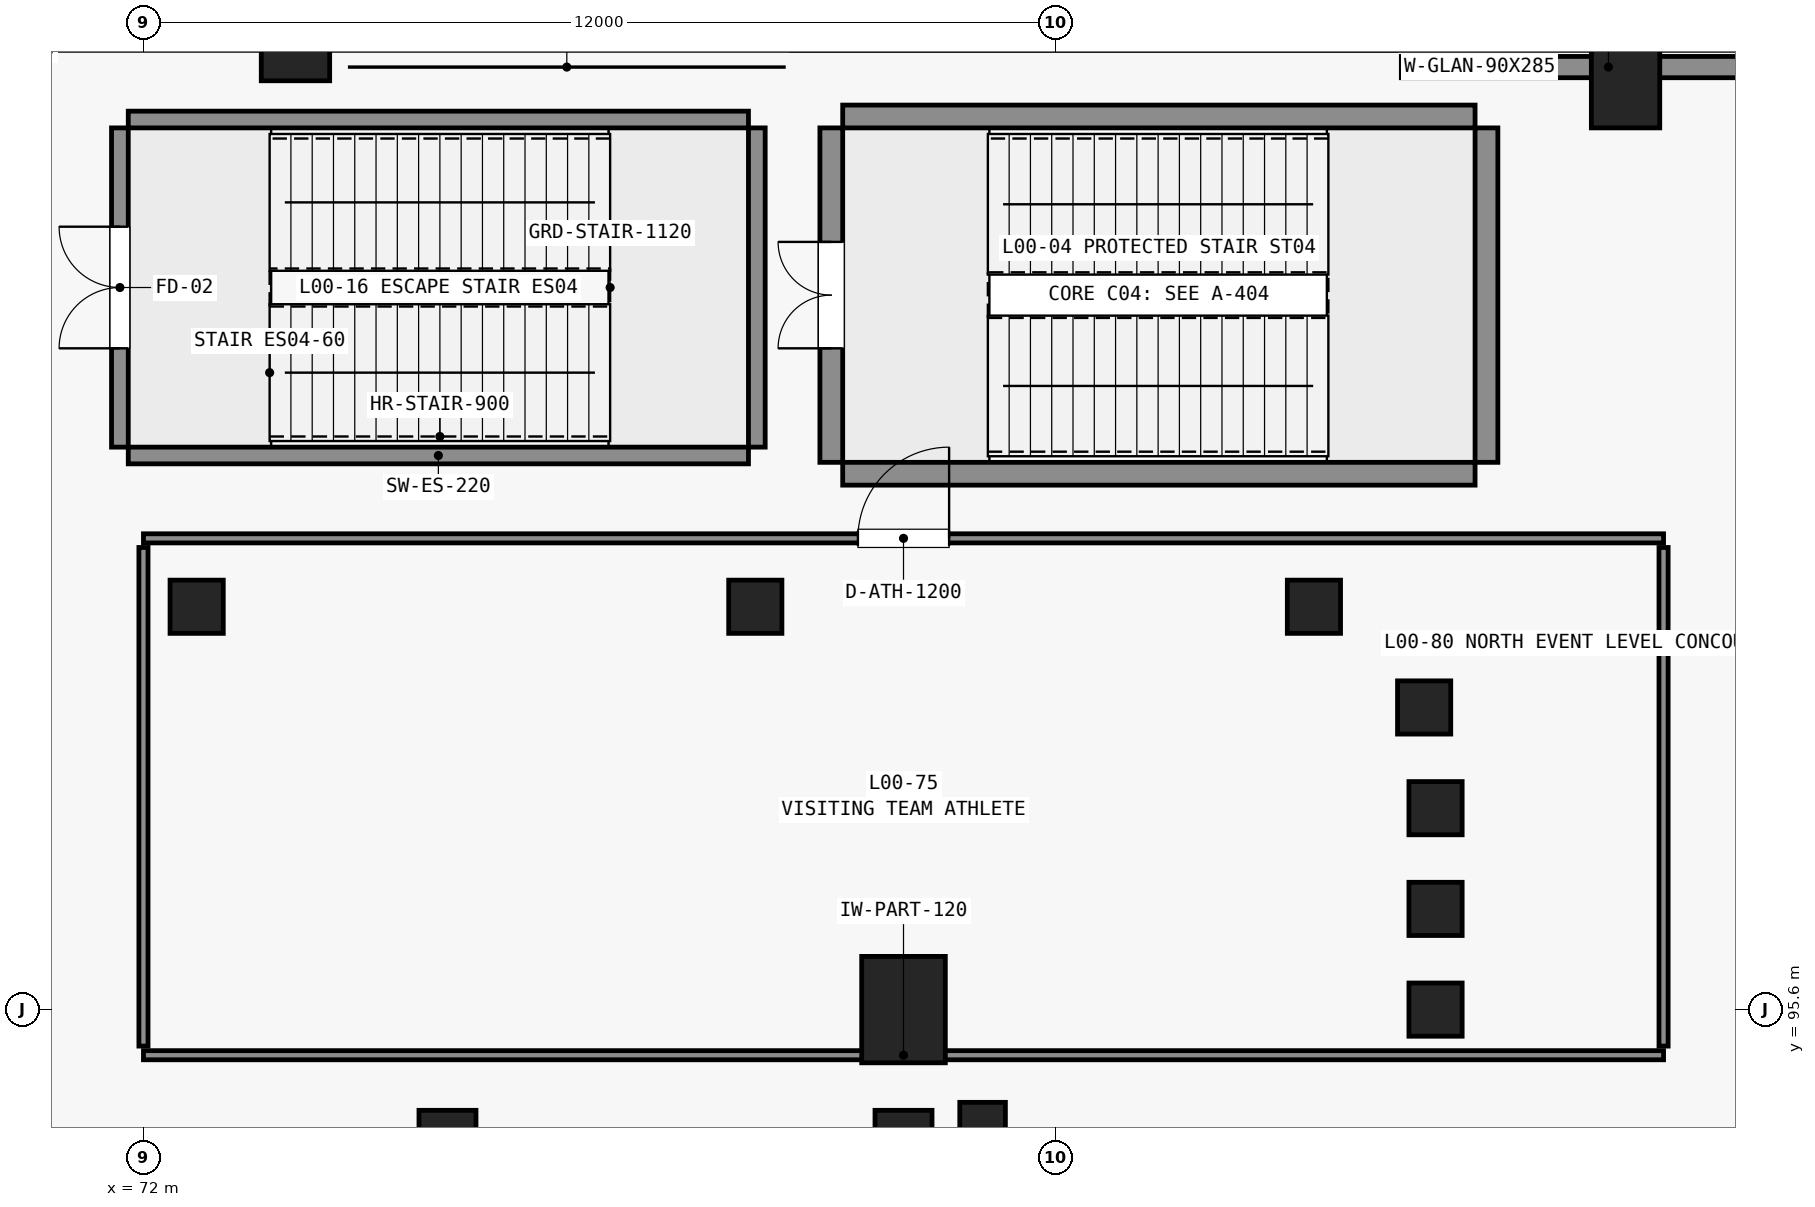
"""IFC4 building model, lengths in metres.
Left out: names, types, materials, properties, quantities, classifications, styles, units other than length and angle.
Written with IfcOpenShell. Run it as: python <this file> out.ifc"""

import sys

from ifc_helpers import new_model, si_unit, direction, frame, frame_2d, origin, origin_2d, place, context, subcontext, project, spatial, rectangle, extrude, element, fill, save


model = new_model("IFC4")
c1 = context("Model", 3, precision=1e-05, world=origin(), true_north=direction((0.0, 1.0)))
c2 = subcontext(c1, "Body", "Model", "MODEL_VIEW")
j1 = project(units=[si_unit("LENGTHUNIT", "METRE"), si_unit("PLANEANGLEUNIT", "RADIAN")], contexts=[c1])
p1 = place(None, origin())
s1 = spatial("IfcSite", under=j1, at=p1, CompositionType="ELEMENT")
p2 = place(p1, origin())
s2 = spatial("IfcBuilding", under=s1, at=p2, CompositionType="ELEMENT")
p3 = place(p2, origin())
s3 = spatial("IfcBuildingStorey", under=s2, at=p3, CompositionType="ELEMENT", Elevation=0.0)
p4 = place(p3, frame((82.0, 95.6, 0.0), z_axis=(0.0, 0.0, 1.0), x_axis=(1.0, 0.0, 0.0)))
e1 = element("IfcColumn", 1, at=p4, inside=s3, PredefinedType="COLUMN", context=c2, shape_type="SweptSolid", body=[
    extrude(rectangle(XDim=1.1, YDim=1.4, at=origin_2d()), origin(), (0.0, 0.0, 1.0), 6.0),
])
for number, where, z_axis, x_axis in (
    (2, (91.5, 107.8, 0.0), (0.0, 0.0, 1.0), (1.0, 0.0, 0.0)),
    (3, (74.0, 108.42, 0.0), (0.0, 0.0, 1.0), (1.0, 0.0, 0.0)),
):
    element("IfcColumn", number, at=place(p3, frame(where, z_axis=z_axis, x_axis=x_axis)), inside=s3, PredefinedType="PILASTER", context=c2, shape_type="SweptSolid", body=[
        extrude(rectangle(XDim=0.9, YDim=1.2, at=origin_2d()), origin(), (0.0, 0.0, 1.0), 6.0),
    ])
for number, where, z_axis, x_axis in (
    (4, (81.2, 102.65, 0.0), (0.0, 0.0, 1.0), (1.0, 0.0, 0.0)),
    (5, (81.2, 107.35, 0.0), (0.0, 0.0, 1.0), (1.0, 0.0, 0.0)),
):
    element("IfcWall", number, at=place(p3, frame(where, z_axis=z_axis, x_axis=x_axis)), inside=s3, PredefinedType="SHEAR", context=c2, shape_type="SweptSolid", body=[
        extrude(rectangle(XDim=8.32, YDim=0.3, at=frame_2d((4.16, 0.0))), origin(), (0.0, 0.0, 1.0), 6.0),
    ])
p5 = place(p3, frame((81.05, 102.8, 0.0), z_axis=(0.0, 0.0, 1.0), x_axis=(0.0, 1.0, 0.0)))
e6 = element("IfcWall", 6, at=p5, inside=s3, PredefinedType="SHEAR", context=c2, shape_type="SweptSolid", body=[
    extrude(rectangle(XDim=4.4, YDim=0.3, at=frame_2d((2.2, 0.0))), origin(), (0.0, 0.0, 1.0), 6.0),
])
p6 = place(p5, frame((1.5, 0.0, 0.0)))
e7 = element("IfcOpeningElement", 7, at=p6, cuts=e6, PredefinedType="OPENING", context=c2, shape_type="SweptSolid", body=[
    extrude(rectangle(XDim=1.4, YDim=2.2, at=frame_2d((0.7, 1.1))), frame((0.0, 0.16, 0.0), z_axis=(0.0, -1.0, 0.0), x_axis=(1.0, 0.0, 0.0)), (0.0, 0.0, 1.0), 0.32),
])
p7 = place(p3, frame((89.67, 102.8, 0.0), z_axis=(0.0, 0.0, 1.0), x_axis=(0.0, 1.0, 0.0)))
e8 = element("IfcWall", 8, at=p7, inside=s3, PredefinedType="SHEAR", context=c2, shape_type="SweptSolid", body=[
    extrude(rectangle(XDim=4.4, YDim=0.3, at=frame_2d((2.2, 0.0))), origin(), (0.0, 0.0, 1.0), 6.0),
])
for number, where, z_axis, x_axis in (
    (9, (89.0, 95.6, 0.0), (0.0, 0.0, 1.0), (1.0, 0.0, 0.0)),
    (10, (89.0, 96.925, 0.0), (0.0, 0.0, 1.0), (1.0, 0.0, 0.0)),
    (11, (89.0, 98.25, 0.0), (0.0, 0.0, 1.0), (1.0, 0.0, 0.0)),
    (12, (88.85, 99.575, 0.0), (0.0, 0.0, 1.0), (1.0, 0.0, 0.0)),
):
    element("IfcColumn", number, at=place(p3, frame(where, z_axis=z_axis, x_axis=x_axis)), inside=s3, PredefinedType="COLUMN", context=c2, shape_type="SweptSolid", body=[
        extrude(rectangle(XDim=0.7, YDim=0.7, at=origin_2d()), origin(), (0.0, 0.0, 1.0), 6.0),
    ])
p8 = place(p3, frame((82.0, 93.9, 0.0), z_axis=(0.0, 0.0, 1.0), x_axis=(1.0, 0.0, 0.0)))
e13 = element("IfcColumn", 13, at=p8, inside=s3, PredefinedType="COLUMN", context=c2, shape_type="SweptSolid", body=[
    extrude(rectangle(XDim=0.75, YDim=0.75, at=origin_2d()), origin(), (0.0, 0.0, 1.0), 6.0),
])
p9 = place(p3, frame((87.4, 100.9, 0.0), z_axis=(0.0, 0.0, 1.0), x_axis=(1.0, 0.0, 0.0)))
e14 = element("IfcColumn", 14, at=p9, inside=s3, PredefinedType="COLUMN", context=c2, shape_type="SweptSolid", body=[
    extrude(rectangle(XDim=0.7, YDim=0.7, at=origin_2d()), origin(), (0.0, 0.0, 1.0), 6.0),
])
p10 = place(p3, frame((76.0, 93.9, 0.0), z_axis=(0.0, 0.0, 1.0), x_axis=(1.0, 0.0, 0.0)))
e15 = element("IfcColumn", 15, at=p10, inside=s3, PredefinedType="COLUMN", context=c2, shape_type="SweptSolid", body=[
    extrude(rectangle(XDim=0.75, YDim=0.75, at=origin_2d()), origin(), (0.0, 0.0, 1.0), 6.0),
])
for number, where, z_axis, x_axis in (
    (16, (80.05, 100.9, 0.0), (0.0, 0.0, 1.0), (1.0, 0.0, 0.0)),
    (17, (72.7, 100.9, 0.0), (0.0, 0.0, 1.0), (1.0, 0.0, 0.0)),
):
    element("IfcColumn", number, at=place(p3, frame(where, z_axis=z_axis, x_axis=x_axis)), inside=s3, PredefinedType="COLUMN", context=c2, shape_type="SweptSolid", body=[
        extrude(rectangle(XDim=0.7, YDim=0.7, at=origin_2d()), origin(), (0.0, 0.0, 1.0), 6.0),
    ])
p11 = place(p3, frame((83.04, 94.08, 0.0), z_axis=(0.0, 0.0, 1.0), x_axis=(1.0, 0.0, 0.0)))
e18 = element("IfcColumn", 18, at=p11, inside=s3, PredefinedType="COLUMN", context=c2, shape_type="SweptSolid", body=[
    extrude(rectangle(XDim=0.6, YDim=0.6, at=origin_2d()), origin(), (0.0, 0.0, 1.0), 6.0),
])
p12 = place(p3, frame((88.55, 108.0, 0.0), z_axis=(0.0, 0.0, 1.0), x_axis=(1.0, 0.0, 0.0)))
e19 = element("IfcWall", 19, at=p12, inside=s3, PredefinedType="STANDARD", context=c2, shape_type="SweptSolid", body=[
    extrude(rectangle(XDim=5.45, YDim=0.28, at=frame_2d((2.725, 0.0))), origin(), (0.0, 0.0, 1.0), 5.64),
])
p13 = place(p12, frame((1.1, 0.0, 0.95)))
e20 = element("IfcOpeningElement", 20, at=p13, cuts=e19, PredefinedType="OPENING", context=c2, shape_type="SweptSolid", body=[
    extrude(rectangle(XDim=0.9, YDim=2.85, at=frame_2d((0.45, 1.425))), frame((0.0, 0.15, 0.0), z_axis=(0.0, -1.0, 0.0), x_axis=(1.0, 0.0, 0.0)), (0.0, 0.0, 1.0), 0.3),
])
for number, where, z_axis, x_axis in (
    (21, (71.8, 102.89, 0.0), (0.0, 0.0, 1.0), (1.0, 0.0, 0.0)),
    (22, (71.8, 107.31, 0.0), (0.0, 0.0, 1.0), (1.0, 0.0, 0.0)),
):
    element("IfcWall", number, at=place(p3, frame(where, z_axis=z_axis, x_axis=x_axis)), inside=s3, PredefinedType="SHEAR", context=c2, shape_type="SweptSolid", body=[
        extrude(rectangle(XDim=8.16, YDim=0.22, at=frame_2d((4.08, 0.0))), origin(), (0.0, 0.0, 1.0), 6.0),
    ])
p14 = place(p3, frame((71.69, 103.0, 0.0), z_axis=(0.0, 0.0, 1.0), x_axis=(0.0, 1.0, 0.0)))
e23 = element("IfcWall", 23, at=p14, inside=s3, PredefinedType="SHEAR", context=c2, shape_type="SweptSolid", body=[
    extrude(rectangle(XDim=4.2, YDim=0.22, at=frame_2d((2.1, 0.0))), origin(), (0.0, 0.0, 1.0), 6.0),
])
p15 = place(p14, frame((1.3, 0.0, 0.0)))
e24 = element("IfcOpeningElement", 24, at=p15, cuts=e23, PredefinedType="OPENING", context=c2, shape_type="SweptSolid", body=[
    extrude(rectangle(XDim=1.6, YDim=2.2, at=frame_2d((0.8, 1.1))), frame((0.0, 0.12, 0.0), z_axis=(0.0, -1.0, 0.0), x_axis=(1.0, 0.0, 0.0)), (0.0, 0.0, 1.0), 0.24),
])
p16 = place(p3, frame((80.07, 103.0, 0.0), z_axis=(0.0, 0.0, 1.0), x_axis=(0.0, 1.0, 0.0)))
e25 = element("IfcWall", 25, at=p16, inside=s3, PredefinedType="SHEAR", context=c2, shape_type="SweptSolid", body=[
    extrude(rectangle(XDim=4.2, YDim=0.22, at=frame_2d((2.1, 0.0))), origin(), (0.0, 0.0, 1.0), 6.0),
])
p17 = place(p3, frame((72.0, 95.0, 0.0), z_axis=(0.0, 0.0, 1.0), x_axis=(1.0, 0.0, 0.0)))
e26 = element("IfcWall", 26, at=p17, inside=s3, PredefinedType="PARTITIONING", context=c2, shape_type="SweptSolid", body=[
    extrude(rectangle(XDim=20.0, YDim=0.12, at=frame_2d((10.0, 0.0))), origin(), (0.0, 0.0, 1.0), 4.79),
])
p18 = place(p3, frame((72.0, 101.8, 0.0), z_axis=(0.0, 0.0, 1.0), x_axis=(1.0, 0.0, 0.0)))
e27 = element("IfcWall", 27, at=p18, inside=s3, PredefinedType="PARTITIONING", context=c2, shape_type="SweptSolid", body=[
    extrude(rectangle(XDim=20.0, YDim=0.12, at=frame_2d((10.0, 0.0))), origin(), (0.0, 0.0, 1.0), 5.64),
])
p19 = place(p18, frame((9.4, 0.0, 0.0)))
e28 = element("IfcOpeningElement", 28, at=p19, cuts=e27, PredefinedType="OPENING", context=c2, shape_type="SweptSolid", body=[
    extrude(rectangle(XDim=1.2, YDim=2.2, at=frame_2d((0.6, 1.1))), frame((0.0, 0.07, 0.0), z_axis=(0.0, -1.0, 0.0), x_axis=(1.0, 0.0, 0.0)), (0.0, 0.0, 1.0), 0.14),
])
for number, where, z_axis, x_axis in (
    (29, (72.0, 95.12, 0.0), (0.0, 0.0, 1.0), (0.0, 1.0, 0.0)),
    (30, (92.0, 95.12, 0.0), (0.0, 0.0, 1.0), (0.0, 1.0, 0.0)),
):
    element("IfcWall", number, at=place(p3, frame(where, z_axis=z_axis, x_axis=x_axis)), inside=s3, PredefinedType="PARTITIONING", context=c2, shape_type="SweptSolid", body=[
        extrude(rectangle(XDim=6.56, YDim=0.12, at=frame_2d((3.28, 0.0))), origin(), (0.0, 0.0, 1.0), 4.79),
    ])
p20 = place(p13, origin())
e31 = element("IfcWindow", 31, at=p20, inside=s3, PartitioningType="DOUBLE_PANEL_VERTICAL", PredefinedType="WINDOW", context=c2, shape_type="SweptSolid", body=[
    extrude(rectangle(XDim=0.9, YDim=2.85, at=frame_2d((0.45, 1.425))), frame((0.0, 0.03, 0.0), z_axis=(0.0, -1.0, 0.0), x_axis=(1.0, 0.0, 0.0)), (0.0, 0.0, 1.0), 0.06),
])
fill(e20, e31)
p21 = place(p6, origin())
e32 = element("IfcDoor", 32, at=p21, inside=s3, OperationType="DOUBLE_DOOR_SINGLE_SWING", PredefinedType="DOOR", context=c2, shape_type="SweptSolid", body=[
    extrude(rectangle(XDim=1.4, YDim=2.2, at=frame_2d((0.7, 1.1))), frame((0.0, 0.025, 0.0), z_axis=(0.0, -1.0, 0.0), x_axis=(1.0, 0.0, 0.0)), (0.0, 0.0, 1.0), 0.05),
])
fill(e7, e32)
p22 = place(p15, origin())
e33 = element("IfcDoor", 33, at=p22, inside=s3, OperationType="DOUBLE_DOOR_SINGLE_SWING", PredefinedType="DOOR", context=c2, shape_type="SweptSolid", body=[
    extrude(rectangle(XDim=1.6, YDim=2.2, at=frame_2d((0.8, 1.1))), frame((0.0, 0.025, 0.0), z_axis=(0.0, -1.0, 0.0), x_axis=(1.0, 0.0, 0.0)), (0.0, 0.0, 1.0), 0.05),
])
fill(e24, e33)
p23 = place(p19, origin())
e34 = element("IfcDoor", 34, at=p23, inside=s3, OperationType="SINGLE_SWING_RIGHT", PredefinedType="DOOR", context=c2, shape_type="SweptSolid", body=[
    extrude(rectangle(XDim=1.2, YDim=2.2, at=frame_2d((0.6, 1.1))), frame((0.0, 0.025, 0.0), z_axis=(0.0, -1.0, 0.0), x_axis=(1.0, 0.0, 0.0)), (0.0, 0.0, 1.0), 0.05),
])
fill(e28, e34)
save(model, sys.argv[1])
